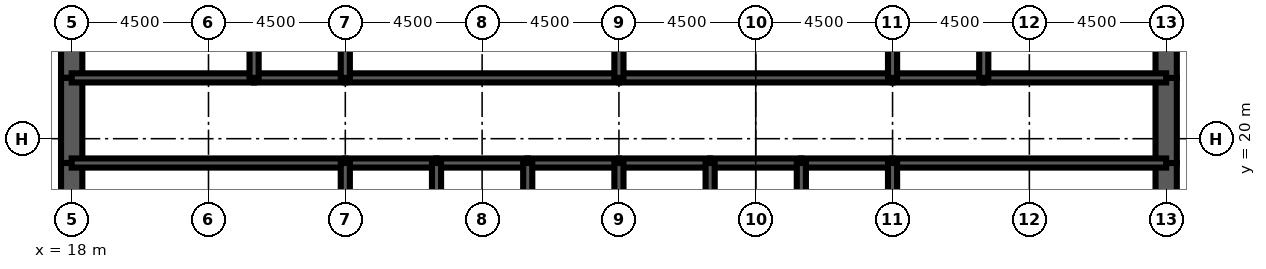
"""IFC4 building model, lengths in metres.
Left out: names, types, materials, properties, quantities, classifications, styles, units other than length and angle.
Written with IfcOpenShell. Run it as: python <this file> out.ifc"""

import sys

from ifc_helpers import new_model, si_unit, direction, frame, frame_2d, origin, place, context, subcontext, project, spatial, rectangle, extrude, element, fill, save


model = new_model("IFC4")
c1 = context("Model", 3, precision=1e-05, world=origin(), true_north=direction((0.0, 1.0)))
c2 = subcontext(c1, "Body", "Model", "MODEL_VIEW")
j1 = project(units=[si_unit("LENGTHUNIT", "METRE"), si_unit("PLANEANGLEUNIT", "RADIAN")], contexts=[c1])
p1 = place(None, origin())
s1 = spatial("IfcSite", under=j1, at=p1, CompositionType="ELEMENT")
p2 = place(p1, origin())
s2 = spatial("IfcBuilding", under=s1, at=p2, CompositionType="ELEMENT")
p3 = place(p2, frame((0.0, 0.0, 325.7)))
s3 = spatial("IfcBuildingStorey", under=s2, at=p3, CompositionType="ELEMENT", Elevation=325.7)
p4 = place(p3, frame((18.0, 26.0, 0.0), z_axis=(0.0, 0.0, 1.0), x_axis=(0.0, -1.0, 0.0)))
e1 = element("IfcWall", 1, at=p4, inside=s3, PredefinedType="SHEAR", context=c2, shape_type="SweptSolid", body=[
    extrude(rectangle(XDim=4.0, YDim=0.7, at=frame_2d((2.0, 0.0))), origin(), (0.0, 0.0, 1.0), 4.2),
])
p5 = place(p3, frame((18.0, 22.0, 0.0), z_axis=(0.0, 0.0, 1.0), x_axis=(0.0, -1.0, 0.0)))
e2 = element("IfcWall", 2, at=p5, inside=s3, PredefinedType="SHEAR", context=c2, shape_type="SweptSolid", body=[
    extrude(rectangle(XDim=2.8, YDim=0.7, at=frame_2d((1.4, 0.0))), origin(), (0.0, 0.0, 1.0), 4.2),
])
p6 = place(p5, frame((0.6, 0.0, 0.0)))
e3 = element("IfcOpeningElement", 3, at=p6, cuts=e2, PredefinedType="OPENING", context=c2, shape_type="SweptSolid", body=[
    extrude(rectangle(XDim=1.8, YDim=2.1, at=frame_2d((0.9, 1.05))), frame((0.0, 0.36, 0.0), z_axis=(0.0, -1.0, 0.0), x_axis=(1.0, 0.0, 0.0)), (0.0, 0.0, 1.0), 0.72),
])
for number, where, z_axis, x_axis in (
    (4, (18.0, 19.2, 0.0), (0.0, 0.0, 1.0), (0.0, -1.0, 0.0)),
    (5, (54.0, 16.0, 0.0), (0.0, 0.0, 1.0), (0.0, 1.0, 0.0)),
):
    element("IfcWall", number, at=place(p3, frame(where, z_axis=z_axis, x_axis=x_axis)), inside=s3, PredefinedType="SHEAR", context=c2, shape_type="SweptSolid", body=[
        extrude(rectangle(XDim=3.2, YDim=0.7, at=frame_2d((1.6, 0.0))), origin(), (0.0, 0.0, 1.0), 4.2),
    ])
p7 = place(p3, frame((54.0, 19.2, 0.0), z_axis=(0.0, 0.0, 1.0), x_axis=(0.0, 1.0, 0.0)))
e6 = element("IfcWall", 6, at=p7, inside=s3, PredefinedType="SHEAR", context=c2, shape_type="SweptSolid", body=[
    extrude(rectangle(XDim=2.8, YDim=0.7, at=frame_2d((1.4, 0.0))), origin(), (0.0, 0.0, 1.0), 4.2),
])
p8 = place(p7, frame((0.4, 0.0, 0.0)))
e7 = element("IfcOpeningElement", 7, at=p8, cuts=e6, PredefinedType="OPENING", context=c2, shape_type="SweptSolid", body=[
    extrude(rectangle(XDim=1.8, YDim=2.1, at=frame_2d((0.9, 1.05))), frame((0.0, 0.36, 0.0), z_axis=(0.0, -1.0, 0.0), x_axis=(1.0, 0.0, 0.0)), (0.0, 0.0, 1.0), 0.72),
])
p9 = place(p3, frame((54.0, 22.0, 0.0), z_axis=(0.0, 0.0, 1.0), x_axis=(0.0, 1.0, 0.0)))
e8 = element("IfcWall", 8, at=p9, inside=s3, PredefinedType="SHEAR", context=c2, shape_type="SweptSolid", body=[
    extrude(rectangle(XDim=4.0, YDim=0.7, at=frame_2d((2.0, 0.0))), origin(), (0.0, 0.0, 1.0), 4.2),
])
p10 = place(p3, frame((18.0, 19.2, 0.0), z_axis=(0.0, 0.0, 1.0), x_axis=(1.0, 0.0, 0.0)))
e9 = element("IfcWall", 9, at=p10, inside=s3, PredefinedType="SOLIDWALL", context=c2, shape_type="SweptSolid", body=[
    extrude(rectangle(XDim=9.0, YDim=0.3, at=frame_2d((4.5, 0.0))), origin(), (0.0, 0.0, 1.0), 4.2),
])
p11 = place(p10, frame((0.65, 0.0, 0.0)))
e10 = element("IfcOpeningElement", 10, at=p11, cuts=e9, PredefinedType="OPENING", context=c2, shape_type="SweptSolid", body=[
    extrude(rectangle(XDim=1.0, YDim=2.1, at=frame_2d((0.5, 1.05))), frame((0.0, 0.16, 0.0), z_axis=(0.0, -1.0, 0.0), x_axis=(1.0, 0.0, 0.0)), (0.0, 0.0, 1.0), 0.32),
])
p12 = place(p3, frame((27.0, 19.2, 0.0), z_axis=(0.0, 0.0, 1.0), x_axis=(1.0, 0.0, 0.0)))
e11 = element("IfcWall", 11, at=p12, inside=s3, PredefinedType="SOLIDWALL", context=c2, shape_type="SweptSolid", body=[
    extrude(rectangle(XDim=3.0, YDim=0.3, at=frame_2d((1.5, 0.0))), origin(), (0.0, 0.0, 1.0), 4.2),
])
p13 = place(p12, frame((0.95, 0.0, 0.0)))
e12 = element("IfcOpeningElement", 12, at=p13, cuts=e11, PredefinedType="OPENING", context=c2, shape_type="SweptSolid", body=[
    extrude(rectangle(XDim=1.1, YDim=2.2, at=frame_2d((0.55, 1.1))), frame((0.0, 0.16, 0.0), z_axis=(0.0, -1.0, 0.0), x_axis=(1.0, 0.0, 0.0)), (0.0, 0.0, 1.0), 0.32),
])
p14 = place(p3, frame((30.0, 19.2, 0.0), z_axis=(0.0, 0.0, 1.0), x_axis=(1.0, 0.0, 0.0)))
e13 = element("IfcWall", 13, at=p14, inside=s3, PredefinedType="SOLIDWALL", context=c2, shape_type="SweptSolid", body=[
    extrude(rectangle(XDim=3.0, YDim=0.3, at=frame_2d((1.5, 0.0))), origin(), (0.0, 0.0, 1.0), 4.2),
])
p15 = place(p14, frame((0.95, 0.0, 0.0)))
e14 = element("IfcOpeningElement", 14, at=p15, cuts=e13, PredefinedType="OPENING", context=c2, shape_type="SweptSolid", body=[
    extrude(rectangle(XDim=1.1, YDim=2.2, at=frame_2d((0.55, 1.1))), frame((0.0, 0.16, 0.0), z_axis=(0.0, -1.0, 0.0), x_axis=(1.0, 0.0, 0.0)), (0.0, 0.0, 1.0), 0.32),
])
p16 = place(p3, frame((33.0, 19.2, 0.0), z_axis=(0.0, 0.0, 1.0), x_axis=(1.0, 0.0, 0.0)))
e15 = element("IfcWall", 15, at=p16, inside=s3, PredefinedType="SOLIDWALL", context=c2, shape_type="SweptSolid", body=[
    extrude(rectangle(XDim=3.0, YDim=0.3, at=frame_2d((1.5, 0.0))), origin(), (0.0, 0.0, 1.0), 4.2),
])
p17 = place(p16, frame((0.95, 0.0, 0.0)))
e16 = element("IfcOpeningElement", 16, at=p17, cuts=e15, PredefinedType="OPENING", context=c2, shape_type="SweptSolid", body=[
    extrude(rectangle(XDim=1.1, YDim=2.2, at=frame_2d((0.55, 1.1))), frame((0.0, 0.16, 0.0), z_axis=(0.0, -1.0, 0.0), x_axis=(1.0, 0.0, 0.0)), (0.0, 0.0, 1.0), 0.32),
])
p18 = place(p3, frame((36.0, 19.2, 0.0), z_axis=(0.0, 0.0, 1.0), x_axis=(1.0, 0.0, 0.0)))
e17 = element("IfcWall", 17, at=p18, inside=s3, PredefinedType="SOLIDWALL", context=c2, shape_type="SweptSolid", body=[
    extrude(rectangle(XDim=3.0, YDim=0.3, at=frame_2d((1.5, 0.0))), origin(), (0.0, 0.0, 1.0), 4.2),
])
p19 = place(p18, frame((0.95, 0.0, 0.0)))
e18 = element("IfcOpeningElement", 18, at=p19, cuts=e17, PredefinedType="OPENING", context=c2, shape_type="SweptSolid", body=[
    extrude(rectangle(XDim=1.1, YDim=2.2, at=frame_2d((0.55, 1.1))), frame((0.0, 0.16, 0.0), z_axis=(0.0, -1.0, 0.0), x_axis=(1.0, 0.0, 0.0)), (0.0, 0.0, 1.0), 0.32),
])
p20 = place(p3, frame((39.0, 19.2, 0.0), z_axis=(0.0, 0.0, 1.0), x_axis=(1.0, 0.0, 0.0)))
e19 = element("IfcWall", 19, at=p20, inside=s3, PredefinedType="SOLIDWALL", context=c2, shape_type="SweptSolid", body=[
    extrude(rectangle(XDim=3.0, YDim=0.3, at=frame_2d((1.5, 0.0))), origin(), (0.0, 0.0, 1.0), 4.2),
])
p21 = place(p20, frame((1.0, 0.0, 0.0)))
e20 = element("IfcOpeningElement", 20, at=p21, cuts=e19, PredefinedType="OPENING", context=c2, shape_type="SweptSolid", body=[
    extrude(rectangle(XDim=1.0, YDim=2.1, at=frame_2d((0.5, 1.05))), frame((0.0, 0.16, 0.0), z_axis=(0.0, -1.0, 0.0), x_axis=(1.0, 0.0, 0.0)), (0.0, 0.0, 1.0), 0.32),
])
p22 = place(p3, frame((42.0, 19.2, 0.0), z_axis=(0.0, 0.0, 1.0), x_axis=(1.0, 0.0, 0.0)))
e21 = element("IfcWall", 21, at=p22, inside=s3, PredefinedType="SOLIDWALL", context=c2, shape_type="SweptSolid", body=[
    extrude(rectangle(XDim=3.0, YDim=0.3, at=frame_2d((1.5, 0.0))), origin(), (0.0, 0.0, 1.0), 4.2),
])
p23 = place(p22, frame((1.0, 0.0, 0.0)))
e22 = element("IfcOpeningElement", 22, at=p23, cuts=e21, PredefinedType="OPENING", context=c2, shape_type="SweptSolid", body=[
    extrude(rectangle(XDim=1.0, YDim=2.1, at=frame_2d((0.5, 1.05))), frame((0.0, 0.16, 0.0), z_axis=(0.0, -1.0, 0.0), x_axis=(1.0, 0.0, 0.0)), (0.0, 0.0, 1.0), 0.32),
])
p24 = place(p3, frame((45.0, 19.2, 0.0), z_axis=(0.0, 0.0, 1.0), x_axis=(1.0, 0.0, 0.0)))
e23 = element("IfcWall", 23, at=p24, inside=s3, PredefinedType="SOLIDWALL", context=c2, shape_type="SweptSolid", body=[
    extrude(rectangle(XDim=9.0, YDim=0.3, at=frame_2d((4.5, 0.0))), origin(), (0.0, 0.0, 1.0), 4.2),
])
p25 = place(p24, frame((7.35, 0.0, 0.0)))
e24 = element("IfcOpeningElement", 24, at=p25, cuts=e23, PredefinedType="OPENING", context=c2, shape_type="SweptSolid", body=[
    extrude(rectangle(XDim=1.0, YDim=2.1, at=frame_2d((0.5, 1.05))), frame((0.0, 0.16, 0.0), z_axis=(0.0, -1.0, 0.0), x_axis=(1.0, 0.0, 0.0)), (0.0, 0.0, 1.0), 0.32),
])
p26 = place(p3, frame((18.0, 22.0, 0.0), z_axis=(0.0, 0.0, 1.0), x_axis=(1.0, 0.0, 0.0)))
e25 = element("IfcWall", 25, at=p26, inside=s3, PredefinedType="SOLIDWALL", context=c2, shape_type="SweptSolid", body=[
    extrude(rectangle(XDim=6.0, YDim=0.3, at=frame_2d((3.0, 0.0))), origin(), (0.0, 0.0, 1.0), 4.2),
])
p27 = place(p26, frame((4.4, 0.0, 0.0)))
e26 = element("IfcOpeningElement", 26, at=p27, cuts=e25, PredefinedType="OPENING", context=c2, shape_type="SweptSolid", body=[
    extrude(rectangle(XDim=1.0, YDim=2.1, at=frame_2d((0.5, 1.05))), frame((0.0, 0.16, 0.0), z_axis=(0.0, -1.0, 0.0), x_axis=(1.0, 0.0, 0.0)), (0.0, 0.0, 1.0), 0.32),
])
p28 = place(p26, frame((0.75, 0.0, 0.0)))
e27 = element("IfcOpeningElement", 27, at=p28, cuts=e25, PredefinedType="OPENING", context=c2, shape_type="SweptSolid", body=[
    extrude(rectangle(XDim=1.0, YDim=2.1, at=frame_2d((0.5, 1.05))), frame((0.0, 0.16, 0.0), z_axis=(0.0, -1.0, 0.0), x_axis=(1.0, 0.0, 0.0)), (0.0, 0.0, 1.0), 0.32),
])
p29 = place(p3, frame((24.0, 22.0, 0.0), z_axis=(0.0, 0.0, 1.0), x_axis=(1.0, 0.0, 0.0)))
e28 = element("IfcWall", 28, at=p29, inside=s3, PredefinedType="SOLIDWALL", context=c2, shape_type="SweptSolid", body=[
    extrude(rectangle(XDim=3.0, YDim=0.3, at=frame_2d((1.5, 0.0))), origin(), (0.0, 0.0, 1.0), 4.2),
])
p30 = place(p29, frame((1.0, 0.0, 0.0)))
e29 = element("IfcOpeningElement", 29, at=p30, cuts=e28, PredefinedType="OPENING", context=c2, shape_type="SweptSolid", body=[
    extrude(rectangle(XDim=1.0, YDim=2.1, at=frame_2d((0.5, 1.05))), frame((0.0, 0.16, 0.0), z_axis=(0.0, -1.0, 0.0), x_axis=(1.0, 0.0, 0.0)), (0.0, 0.0, 1.0), 0.32),
])
p31 = place(p3, frame((27.0, 22.0, 0.0), z_axis=(0.0, 0.0, 1.0), x_axis=(1.0, 0.0, 0.0)))
e30 = element("IfcWall", 30, at=p31, inside=s3, PredefinedType="SOLIDWALL", context=c2, shape_type="SweptSolid", body=[
    extrude(rectangle(XDim=9.0, YDim=0.3, at=frame_2d((4.5, 0.0))), origin(), (0.0, 0.0, 1.0), 4.2),
])
p32 = place(p31, frame((4.0, 0.0, 0.0)))
e31 = element("IfcOpeningElement", 31, at=p32, cuts=e30, PredefinedType="OPENING", context=c2, shape_type="SweptSolid", body=[
    extrude(rectangle(XDim=1.0, YDim=2.1, at=frame_2d((0.5, 1.05))), frame((0.0, 0.16, 0.0), z_axis=(0.0, -1.0, 0.0), x_axis=(1.0, 0.0, 0.0)), (0.0, 0.0, 1.0), 0.32),
])
p33 = place(p3, frame((36.0, 22.0, 0.0), z_axis=(0.0, 0.0, 1.0), x_axis=(1.0, 0.0, 0.0)))
e32 = element("IfcWall", 32, at=p33, inside=s3, PredefinedType="SOLIDWALL", context=c2, shape_type="SweptSolid", body=[
    extrude(rectangle(XDim=9.0, YDim=0.3, at=frame_2d((4.5, 0.0))), origin(), (0.0, 0.0, 1.0), 4.2),
])
p34 = place(p33, frame((4.0, 0.0, 0.0)))
e33 = element("IfcOpeningElement", 33, at=p34, cuts=e32, PredefinedType="OPENING", context=c2, shape_type="SweptSolid", body=[
    extrude(rectangle(XDim=1.0, YDim=2.1, at=frame_2d((0.5, 1.05))), frame((0.0, 0.16, 0.0), z_axis=(0.0, -1.0, 0.0), x_axis=(1.0, 0.0, 0.0)), (0.0, 0.0, 1.0), 0.32),
])
p35 = place(p3, frame((45.0, 22.0, 0.0), z_axis=(0.0, 0.0, 1.0), x_axis=(1.0, 0.0, 0.0)))
e34 = element("IfcWall", 34, at=p35, inside=s3, PredefinedType="SOLIDWALL", context=c2, shape_type="SweptSolid", body=[
    extrude(rectangle(XDim=3.0, YDim=0.3, at=frame_2d((1.5, 0.0))), origin(), (0.0, 0.0, 1.0), 4.2),
])
p36 = place(p35, frame((1.0, 0.0, 0.0)))
e35 = element("IfcOpeningElement", 35, at=p36, cuts=e34, PredefinedType="OPENING", context=c2, shape_type="SweptSolid", body=[
    extrude(rectangle(XDim=1.0, YDim=2.1, at=frame_2d((0.5, 1.05))), frame((0.0, 0.16, 0.0), z_axis=(0.0, -1.0, 0.0), x_axis=(1.0, 0.0, 0.0)), (0.0, 0.0, 1.0), 0.32),
])
p37 = place(p3, frame((48.0, 22.0, 0.0), z_axis=(0.0, 0.0, 1.0), x_axis=(1.0, 0.0, 0.0)))
e36 = element("IfcWall", 36, at=p37, inside=s3, PredefinedType="SOLIDWALL", context=c2, shape_type="SweptSolid", body=[
    extrude(rectangle(XDim=6.0, YDim=0.3, at=frame_2d((3.0, 0.0))), origin(), (0.0, 0.0, 1.0), 4.2),
])
p38 = place(p37, frame((2.0, 0.0, 0.0)))
e37 = element("IfcOpeningElement", 37, at=p38, cuts=e36, PredefinedType="OPENING", context=c2, shape_type="SweptSolid", body=[
    extrude(rectangle(XDim=1.0, YDim=2.1, at=frame_2d((0.5, 1.05))), frame((0.0, 0.16, 0.0), z_axis=(0.0, -1.0, 0.0), x_axis=(1.0, 0.0, 0.0)), (0.0, 0.0, 1.0), 0.32),
])
p39 = place(p37, frame((4.4, 0.0, 0.0)))
e38 = element("IfcOpeningElement", 38, at=p39, cuts=e36, PredefinedType="OPENING", context=c2, shape_type="SweptSolid", body=[
    extrude(rectangle(XDim=1.0, YDim=2.1, at=frame_2d((0.5, 1.05))), frame((0.0, 0.16, 0.0), z_axis=(0.0, -1.0, 0.0), x_axis=(1.0, 0.0, 0.0)), (0.0, 0.0, 1.0), 0.32),
])
for number, where, z_axis, x_axis in (
    (39, (27.0, 16.0, 0.0), (0.0, 0.0, 1.0), (0.0, 1.0, 0.0)),
    (40, (30.0, 16.0, 0.0), (0.0, 0.0, 1.0), (0.0, 1.0, 0.0)),
    (41, (33.0, 16.0, 0.0), (0.0, 0.0, 1.0), (0.0, 1.0, 0.0)),
    (42, (36.0, 16.0, 0.0), (0.0, 0.0, 1.0), (0.0, 1.0, 0.0)),
    (43, (39.0, 16.0, 0.0), (0.0, 0.0, 1.0), (0.0, 1.0, 0.0)),
    (44, (42.0, 16.0, 0.0), (0.0, 0.0, 1.0), (0.0, 1.0, 0.0)),
    (45, (45.0, 16.0, 0.0), (0.0, 0.0, 1.0), (0.0, 1.0, 0.0)),
):
    element("IfcWall", number, at=place(p3, frame(where, z_axis=z_axis, x_axis=x_axis)), inside=s3, PredefinedType="SOLIDWALL", context=c2, shape_type="SweptSolid", body=[
        extrude(rectangle(XDim=3.2, YDim=0.3, at=frame_2d((1.6, 0.0))), origin(), (0.0, 0.0, 1.0), 4.2),
    ])
for number, where, z_axis, x_axis in (
    (46, (24.0, 22.0, 0.0), (0.0, 0.0, 1.0), (0.0, 1.0, 0.0)),
    (47, (27.0, 22.0, 0.0), (0.0, 0.0, 1.0), (0.0, 1.0, 0.0)),
    (48, (36.0, 22.0, 0.0), (0.0, 0.0, 1.0), (0.0, 1.0, 0.0)),
    (49, (45.0, 22.0, 0.0), (0.0, 0.0, 1.0), (0.0, 1.0, 0.0)),
    (50, (48.0, 22.0, 0.0), (0.0, 0.0, 1.0), (0.0, 1.0, 0.0)),
):
    element("IfcWall", number, at=place(p3, frame(where, z_axis=z_axis, x_axis=x_axis)), inside=s3, PredefinedType="SOLIDWALL", context=c2, shape_type="SweptSolid", body=[
        extrude(rectangle(XDim=4.0, YDim=0.3, at=frame_2d((2.0, 0.0))), origin(), (0.0, 0.0, 1.0), 4.2),
    ])
p40 = place(p3, frame((42.0, 22.15, 0.0), z_axis=(0.0, 0.0, 1.0), x_axis=(0.0, 1.0, 0.0)))
e51 = element("IfcWall", 51, at=p40, inside=s3, PredefinedType="PARTITIONING", context=c2, shape_type="SweptSolid", body=[
    extrude(rectangle(XDim=3.7, YDim=0.15, at=frame_2d((1.85, 0.0))), origin(), (0.0, 0.0, 1.0), 3.0),
])
p41 = place(p40, frame((2.2, 0.0, 0.0)))
e52 = element("IfcOpeningElement", 52, at=p41, cuts=e51, PredefinedType="OPENING", context=c2, shape_type="SweptSolid", body=[
    extrude(rectangle(XDim=1.0, YDim=2.1, at=frame_2d((0.5, 1.05))), frame((0.0, 0.085, 0.0), z_axis=(0.0, -1.0, 0.0), x_axis=(1.0, 0.0, 0.0)), (0.0, 0.0, 1.0), 0.17),
])
for number, where, z_axis, x_axis in (
    (53, (20.225, 22.15, 0.0), (0.0, 0.0, 1.0), (0.0, 1.0, 0.0)),
    (54, (52.075, 22.15, 0.0), (0.0, 0.0, 1.0), (0.0, 1.0, 0.0)),
):
    element("IfcWall", number, at=place(p3, frame(where, z_axis=z_axis, x_axis=x_axis)), inside=s3, PredefinedType="PARTITIONING", context=c2, shape_type="SweptSolid", body=[
        extrude(rectangle(XDim=3.7, YDim=0.15, at=frame_2d((1.85, 0.0))), origin(), (0.0, 0.0, 1.0), 3.0),
    ])
p42 = place(p13, origin())
e55 = element("IfcDoor", 55, at=p42, inside=s3, OperationType="DOUBLE_DOOR_SLIDING", PredefinedType="USERDEFINED", context=c2, shape_type="SweptSolid", body=[
    extrude(rectangle(XDim=1.1, YDim=2.2, at=frame_2d((0.55, 1.1))), frame((0.0, 0.025, 0.0), z_axis=(0.0, -1.0, 0.0), x_axis=(1.0, 0.0, 0.0)), (0.0, 0.0, 1.0), 0.05),
])
fill(e12, e55)
p43 = place(p15, origin())
e56 = element("IfcDoor", 56, at=p43, inside=s3, OperationType="DOUBLE_DOOR_SLIDING", PredefinedType="USERDEFINED", context=c2, shape_type="SweptSolid", body=[
    extrude(rectangle(XDim=1.1, YDim=2.2, at=frame_2d((0.55, 1.1))), frame((0.0, 0.025, 0.0), z_axis=(0.0, -1.0, 0.0), x_axis=(1.0, 0.0, 0.0)), (0.0, 0.0, 1.0), 0.05),
])
fill(e14, e56)
p44 = place(p17, origin())
e57 = element("IfcDoor", 57, at=p44, inside=s3, OperationType="DOUBLE_DOOR_SLIDING", PredefinedType="USERDEFINED", context=c2, shape_type="SweptSolid", body=[
    extrude(rectangle(XDim=1.1, YDim=2.2, at=frame_2d((0.55, 1.1))), frame((0.0, 0.025, 0.0), z_axis=(0.0, -1.0, 0.0), x_axis=(1.0, 0.0, 0.0)), (0.0, 0.0, 1.0), 0.05),
])
fill(e16, e57)
p45 = place(p19, origin())
e58 = element("IfcDoor", 58, at=p45, inside=s3, OperationType="DOUBLE_DOOR_SLIDING", PredefinedType="USERDEFINED", context=c2, shape_type="SweptSolid", body=[
    extrude(rectangle(XDim=1.1, YDim=2.2, at=frame_2d((0.55, 1.1))), frame((0.0, 0.025, 0.0), z_axis=(0.0, -1.0, 0.0), x_axis=(1.0, 0.0, 0.0)), (0.0, 0.0, 1.0), 0.05),
])
fill(e18, e58)
p46 = place(p11, origin())
e59 = element("IfcDoor", 59, at=p46, inside=s3, OperationType="SINGLE_SWING_LEFT", PredefinedType="DOOR", context=c2, shape_type="SweptSolid", body=[
    extrude(rectangle(XDim=1.0, YDim=2.1, at=frame_2d((0.5, 1.05))), frame((0.0, 0.025, 0.0), z_axis=(0.0, -1.0, 0.0), x_axis=(1.0, 0.0, 0.0)), (0.0, 0.0, 1.0), 0.05),
])
fill(e10, e59)
p47 = place(p25, origin())
e60 = element("IfcDoor", 60, at=p47, inside=s3, OperationType="SINGLE_SWING_RIGHT", PredefinedType="DOOR", context=c2, shape_type="SweptSolid", body=[
    extrude(rectangle(XDim=1.0, YDim=2.1, at=frame_2d((0.5, 1.05))), frame((0.0, 0.025, 0.0), z_axis=(0.0, -1.0, 0.0), x_axis=(1.0, 0.0, 0.0)), (0.0, 0.0, 1.0), 0.05),
])
fill(e24, e60)
p48 = place(p6, origin())
e61 = element("IfcDoor", 61, at=p48, inside=s3, OperationType="SINGLE_SWING_LEFT", PredefinedType="DOOR", context=c2, shape_type="SweptSolid", body=[
    extrude(rectangle(XDim=1.8, YDim=2.1, at=frame_2d((0.9, 1.05))), frame((0.0, 0.35, 0.0), z_axis=(0.0, -1.0, 0.0), x_axis=(1.0, 0.0, 0.0)), (0.0, 0.0, 1.0), 0.699),
])
fill(e3, e61)
p49 = place(p8, origin())
e62 = element("IfcDoor", 62, at=p49, inside=s3, OperationType="SINGLE_SWING_LEFT", PredefinedType="DOOR", context=c2, shape_type="SweptSolid", body=[
    extrude(rectangle(XDim=1.8, YDim=2.1, at=frame_2d((0.9, 1.05))), frame((0.0, 0.35, 0.0), z_axis=(0.0, -1.0, 0.0), x_axis=(1.0, 0.0, 0.0)), (0.0, 0.0, 1.0), 0.699),
])
fill(e7, e62)
p50 = place(p27, origin())
e63 = element("IfcDoor", 63, at=p50, inside=s3, OperationType="SINGLE_SWING_RIGHT", PredefinedType="DOOR", context=c2, shape_type="SweptSolid", body=[
    extrude(rectangle(XDim=1.0, YDim=2.1, at=frame_2d((0.5, 1.05))), frame((0.0, 0.025, 0.0), z_axis=(0.0, -1.0, 0.0), x_axis=(1.0, 0.0, 0.0)), (0.0, 0.0, 1.0), 0.05),
])
fill(e26, e63)
p51 = place(p30, origin())
e64 = element("IfcDoor", 64, at=p51, inside=s3, OperationType="SINGLE_SWING_LEFT", PredefinedType="DOOR", context=c2, shape_type="SweptSolid", body=[
    extrude(rectangle(XDim=1.0, YDim=2.1, at=frame_2d((0.5, 1.05))), frame((0.0, 0.025, 0.0), z_axis=(0.0, -1.0, 0.0), x_axis=(1.0, 0.0, 0.0)), (0.0, 0.0, 1.0), 0.05),
])
fill(e29, e64)
p52 = place(p32, origin())
e65 = element("IfcDoor", 65, at=p52, inside=s3, OperationType="SINGLE_SWING_LEFT", PredefinedType="DOOR", context=c2, shape_type="SweptSolid", body=[
    extrude(rectangle(XDim=1.0, YDim=2.1, at=frame_2d((0.5, 1.05))), frame((0.0, 0.025, 0.0), z_axis=(0.0, -1.0, 0.0), x_axis=(1.0, 0.0, 0.0)), (0.0, 0.0, 1.0), 0.05),
])
fill(e31, e65)
p53 = place(p34, origin())
e66 = element("IfcDoor", 66, at=p53, inside=s3, OperationType="SINGLE_SWING_LEFT", PredefinedType="DOOR", context=c2, shape_type="SweptSolid", body=[
    extrude(rectangle(XDim=1.0, YDim=2.1, at=frame_2d((0.5, 1.05))), frame((0.0, 0.025, 0.0), z_axis=(0.0, -1.0, 0.0), x_axis=(1.0, 0.0, 0.0)), (0.0, 0.0, 1.0), 0.05),
])
fill(e33, e66)
p54 = place(p36, origin())
e67 = element("IfcDoor", 67, at=p54, inside=s3, OperationType="SINGLE_SWING_LEFT", PredefinedType="DOOR", context=c2, shape_type="SweptSolid", body=[
    extrude(rectangle(XDim=1.0, YDim=2.1, at=frame_2d((0.5, 1.05))), frame((0.0, 0.025, 0.0), z_axis=(0.0, -1.0, 0.0), x_axis=(1.0, 0.0, 0.0)), (0.0, 0.0, 1.0), 0.05),
])
fill(e35, e67)
p55 = place(p38, origin())
e68 = element("IfcDoor", 68, at=p55, inside=s3, OperationType="SINGLE_SWING_LEFT", PredefinedType="DOOR", context=c2, shape_type="SweptSolid", body=[
    extrude(rectangle(XDim=1.0, YDim=2.1, at=frame_2d((0.5, 1.05))), frame((0.0, 0.025, 0.0), z_axis=(0.0, -1.0, 0.0), x_axis=(1.0, 0.0, 0.0)), (0.0, 0.0, 1.0), 0.05),
])
fill(e37, e68)
p56 = place(p28, origin())
e69 = element("IfcDoor", 69, at=p56, inside=s3, OperationType="SINGLE_SWING_LEFT", PredefinedType="DOOR", context=c2, shape_type="SweptSolid", body=[
    extrude(rectangle(XDim=1.0, YDim=2.1, at=frame_2d((0.5, 1.05))), frame((0.0, 0.025, 0.0), z_axis=(0.0, -1.0, 0.0), x_axis=(1.0, 0.0, 0.0)), (0.0, 0.0, 1.0), 0.05),
])
fill(e27, e69)
p57 = place(p39, origin())
e70 = element("IfcDoor", 70, at=p57, inside=s3, OperationType="SINGLE_SWING_RIGHT", PredefinedType="DOOR", context=c2, shape_type="SweptSolid", body=[
    extrude(rectangle(XDim=1.0, YDim=2.1, at=frame_2d((0.5, 1.05))), frame((0.0, 0.025, 0.0), z_axis=(0.0, -1.0, 0.0), x_axis=(1.0, 0.0, 0.0)), (0.0, 0.0, 1.0), 0.05),
])
fill(e38, e70)
p58 = place(p21, origin())
e71 = element("IfcDoor", 71, at=p58, inside=s3, OperationType="SINGLE_SWING_LEFT", PredefinedType="DOOR", context=c2, shape_type="SweptSolid", body=[
    extrude(rectangle(XDim=1.0, YDim=2.1, at=frame_2d((0.5, 1.05))), frame((0.0, 0.025, 0.0), z_axis=(0.0, -1.0, 0.0), x_axis=(1.0, 0.0, 0.0)), (0.0, 0.0, 1.0), 0.05),
])
fill(e20, e71)
p59 = place(p23, origin())
e72 = element("IfcDoor", 72, at=p59, inside=s3, OperationType="SINGLE_SWING_LEFT", PredefinedType="DOOR", context=c2, shape_type="SweptSolid", body=[
    extrude(rectangle(XDim=1.0, YDim=2.1, at=frame_2d((0.5, 1.05))), frame((0.0, 0.025, 0.0), z_axis=(0.0, -1.0, 0.0), x_axis=(1.0, 0.0, 0.0)), (0.0, 0.0, 1.0), 0.05),
])
fill(e22, e72)
save(model, sys.argv[1])
